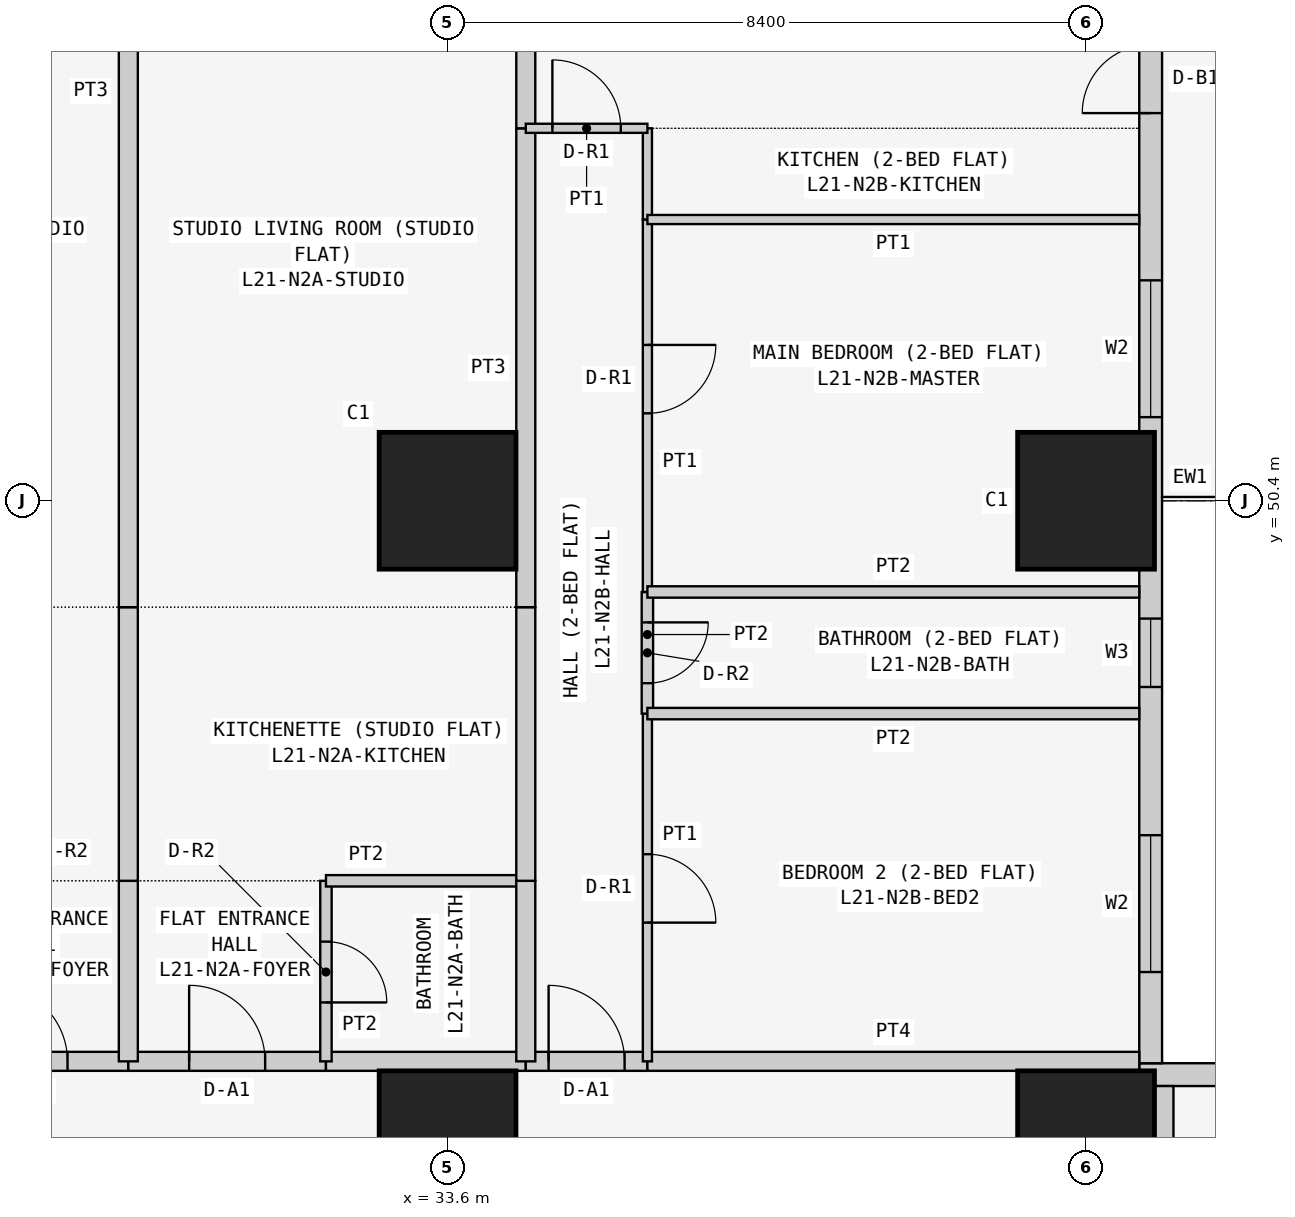
"""IFC4 building model, lengths in metres.
Left out: names, types, materials, properties, quantities, classifications, styles, units other than length and angle.
Written with IfcOpenShell. Run it as: python <this file> out.ifc"""

import sys

from ifc_helpers import new_model, si_unit, direction, frame, frame_2d, origin, origin_2d, place, context, subcontext, project, spatial, rectangle, extrude, element, fill, save


model = new_model("IFC4")
c1 = context("Model", 3, precision=1e-05, world=origin(), true_north=direction((0.0, 1.0)))
c2 = subcontext(c1, "Body", "Model", "MODEL_VIEW")
j1 = project(units=[si_unit("LENGTHUNIT", "METRE"), si_unit("PLANEANGLEUNIT", "RADIAN")], contexts=[c1])
p1 = place(None, origin())
s1 = spatial("IfcSite", under=j1, at=p1, CompositionType="ELEMENT")
p2 = place(p1, origin())
s2 = spatial("IfcBuilding", under=s1, at=p2, CompositionType="ELEMENT")
p3 = place(p2, frame((0.0, 0.0, 84.9)))
s3 = spatial("IfcBuildingStorey", under=s2, at=p3, CompositionType="ELEMENT", Elevation=84.9)
for number, where, z_axis, x_axis in (
    (1, (33.6, 42.0, 0.0), (0.0, 0.0, 1.0), (1.0, 0.0, 0.0)),
    (2, (33.6, 50.4, 0.0), (0.0, 0.0, 1.0), (1.0, 0.0, 0.0)),
    (3, (42.0, 42.0, 0.0), (0.0, 0.0, 1.0), (1.0, 0.0, 0.0)),
    (4, (42.0, 50.4, 0.0), (0.0, 0.0, 1.0), (1.0, 0.0, 0.0)),
):
    element("IfcColumn", number, at=place(p3, frame(where, z_axis=z_axis, x_axis=x_axis)), inside=s3, PredefinedType="COLUMN", context=c2, shape_type="SweptSolid", body=[
        extrude(rectangle(XDim=1.8, YDim=1.8, at=origin_2d()), origin(), (0.0, 0.0, 1.0), 3.6),
    ])
p4 = place(p3, frame((58.4, 42.85, 0.0), z_axis=(0.0, 0.0, 1.0), x_axis=(-1.0, 0.0, 0.0)))
e5 = element("IfcWall", 5, at=p4, inside=s3, PredefinedType="SOLIDWALL", context=c2, shape_type="SweptSolid", body=[
    extrude(rectangle(XDim=15.7, YDim=0.3, at=frame_2d((7.85, 0.0))), origin(), (0.0, 0.0, 1.0), 3.45),
])
p5 = place(p4, frame((12.4, 0.0, 0.9)))
e6 = element("IfcOpeningElement", 6, at=p5, cuts=e5, PredefinedType="OPENING", context=c2, shape_type="SweptSolid", body=[
    extrude(rectangle(XDim=1.8, YDim=1.5, at=frame_2d((0.9, 0.75))), frame((0.0, 0.16, 0.0), z_axis=(0.0, -1.0, 0.0), x_axis=(1.0, 0.0, 0.0)), (0.0, 0.0, 1.0), 0.32),
])
p6 = place(p4, frame((9.55, 0.0, 1.5)))
e7 = element("IfcOpeningElement", 7, at=p6, cuts=e5, PredefinedType="OPENING", context=c2, shape_type="SweptSolid", body=[
    extrude(rectangle(XDim=0.9, YDim=0.7, at=frame_2d((0.45, 0.35))), frame((0.0, 0.16, 0.0), z_axis=(0.0, -1.0, 0.0), x_axis=(1.0, 0.0, 0.0)), (0.0, 0.0, 1.0), 0.32),
])
p7 = place(p4, frame((5.1, 0.0, 0.9)))
e8 = element("IfcOpeningElement", 8, at=p7, cuts=e5, PredefinedType="OPENING", context=c2, shape_type="SweptSolid", body=[
    extrude(rectangle(XDim=1.8, YDim=1.5, at=frame_2d((0.9, 0.75))), frame((0.0, 0.16, 0.0), z_axis=(0.0, -1.0, 0.0), x_axis=(1.0, 0.0, 0.0)), (0.0, 0.0, 1.0), 0.32),
])
p8 = place(p4, frame((2.0, 0.0, 0.0)))
e9 = element("IfcOpeningElement", 9, at=p8, cuts=e5, PredefinedType="OPENING", context=c2, shape_type="SweptSolid", body=[
    extrude(rectangle(XDim=0.9, YDim=2.4, at=frame_2d((0.45, 1.2))), frame((0.0, 0.16, 0.0), z_axis=(0.0, -1.0, 0.0), x_axis=(1.0, 0.0, 0.0)), (0.0, 0.0, 1.0), 0.32),
])
p9 = place(p4, frame((0.7, 0.0, 0.9)))
e10 = element("IfcOpeningElement", 10, at=p9, cuts=e5, PredefinedType="OPENING", context=c2, shape_type="SweptSolid", body=[
    extrude(rectangle(XDim=1.2, YDim=1.5, at=frame_2d((0.6, 0.75))), frame((0.0, 0.16, 0.0), z_axis=(0.0, -1.0, 0.0), x_axis=(1.0, 0.0, 0.0)), (0.0, 0.0, 1.0), 0.32),
])
p10 = place(p3, frame((42.85, 43.0, 0.0), z_axis=(0.0, 0.0, 1.0), x_axis=(0.0, 1.0, 0.0)))
e11 = element("IfcWall", 11, at=p10, inside=s3, PredefinedType="SOLIDWALL", context=c2, shape_type="SweptSolid", body=[
    extrude(rectangle(XDim=15.4, YDim=0.3, at=frame_2d((7.7, 0.0))), origin(), (0.0, 0.0, 1.0), 3.45),
])
p11 = place(p10, frame((1.2, 0.0, 0.9)))
e12 = element("IfcOpeningElement", 12, at=p11, cuts=e11, PredefinedType="OPENING", context=c2, shape_type="SweptSolid", body=[
    extrude(rectangle(XDim=1.8, YDim=1.5, at=frame_2d((0.9, 0.75))), frame((0.0, 0.16, 0.0), z_axis=(0.0, -1.0, 0.0), x_axis=(1.0, 0.0, 0.0)), (0.0, 0.0, 1.0), 0.32),
])
p12 = place(p10, frame((4.95, 0.0, 1.5)))
e13 = element("IfcOpeningElement", 13, at=p12, cuts=e11, PredefinedType="OPENING", context=c2, shape_type="SweptSolid", body=[
    extrude(rectangle(XDim=0.9, YDim=0.7, at=frame_2d((0.45, 0.35))), frame((0.0, 0.16, 0.0), z_axis=(0.0, -1.0, 0.0), x_axis=(1.0, 0.0, 0.0)), (0.0, 0.0, 1.0), 0.32),
])
p13 = place(p10, frame((8.5, 0.0, 0.9)))
e14 = element("IfcOpeningElement", 14, at=p13, cuts=e11, PredefinedType="OPENING", context=c2, shape_type="SweptSolid", body=[
    extrude(rectangle(XDim=1.8, YDim=1.5, at=frame_2d((0.9, 0.75))), frame((0.0, 0.16, 0.0), z_axis=(0.0, -1.0, 0.0), x_axis=(1.0, 0.0, 0.0)), (0.0, 0.0, 1.0), 0.32),
])
p14 = place(p10, frame((12.5, 0.0, 0.0)))
e15 = element("IfcOpeningElement", 15, at=p14, cuts=e11, PredefinedType="OPENING", context=c2, shape_type="SweptSolid", body=[
    extrude(rectangle(XDim=0.9, YDim=2.4, at=frame_2d((0.45, 1.2))), frame((0.0, 0.16, 0.0), z_axis=(0.0, -1.0, 0.0), x_axis=(1.0, 0.0, 0.0)), (0.0, 0.0, 1.0), 0.32),
])
p15 = place(p10, frame((13.5, 0.0, 0.9)))
e16 = element("IfcOpeningElement", 16, at=p15, cuts=e11, PredefinedType="OPENING", context=c2, shape_type="SweptSolid", body=[
    extrude(rectangle(XDim=1.2, YDim=1.5, at=frame_2d((0.6, 0.75))), frame((0.0, 0.16, 0.0), z_axis=(0.0, -1.0, 0.0), x_axis=(1.0, 0.0, 0.0)), (0.0, 0.0, 1.0), 0.32),
])
p16 = place(p3, frame((26.8, 43.025, 0.0), z_axis=(0.0, 0.0, 1.0), x_axis=(1.0, 0.0, 0.0)))
e17 = element("IfcWall", 17, at=p16, inside=s3, PredefinedType="PARTITIONING", context=c2, shape_type="SweptSolid", body=[
    extrude(rectangle(XDim=2.6, YDim=0.25, at=frame_2d((1.3, 0.0))), origin(), (0.0, 0.0, 1.0), 3.45),
])
p17 = place(p16, frame((0.8, 0.0, 0.0)))
e18 = element("IfcOpeningElement", 18, at=p17, cuts=e17, PredefinedType="OPENING", context=c2, shape_type="SweptSolid", body=[
    extrude(rectangle(XDim=1.0, YDim=2.1, at=frame_2d((0.5, 1.05))), frame((0.0, 0.135, 0.0), z_axis=(0.0, -1.0, 0.0), x_axis=(1.0, 0.0, 0.0)), (0.0, 0.0, 1.0), 0.27),
])
p18 = place(p3, frame((29.4, 43.025, 0.0), z_axis=(0.0, 0.0, 1.0), x_axis=(1.0, 0.0, 0.0)))
e19 = element("IfcWall", 19, at=p18, inside=s3, PredefinedType="PARTITIONING", context=c2, shape_type="SweptSolid", body=[
    extrude(rectangle(XDim=2.6, YDim=0.25, at=frame_2d((1.3, 0.0))), origin(), (0.0, 0.0, 1.0), 3.45),
])
p19 = place(p18, frame((0.8, 0.0, 0.0)))
e20 = element("IfcOpeningElement", 20, at=p19, cuts=e19, PredefinedType="OPENING", context=c2, shape_type="SweptSolid", body=[
    extrude(rectangle(XDim=1.0, YDim=2.1, at=frame_2d((0.5, 1.05))), frame((0.0, 0.135, 0.0), z_axis=(0.0, -1.0, 0.0), x_axis=(1.0, 0.0, 0.0)), (0.0, 0.0, 1.0), 0.27),
])
p20 = place(p3, frame((32.0, 43.025, 0.0), z_axis=(0.0, 0.0, 1.0), x_axis=(1.0, 0.0, 0.0)))
e21 = element("IfcWall", 21, at=p20, inside=s3, PredefinedType="PARTITIONING", context=c2, shape_type="SweptSolid", body=[
    extrude(rectangle(XDim=2.629, YDim=0.25, at=frame_2d((1.314, 0.0))), origin(), (0.0, 0.0, 1.0), 3.45),
])
p21 = place(p3, frame((34.629, 43.025, 0.0), z_axis=(0.0, 0.0, 1.0), x_axis=(1.0, 0.0, 0.0)))
e22 = element("IfcWall", 22, at=p21, inside=s3, PredefinedType="PARTITIONING", context=c2, shape_type="SweptSolid", body=[
    extrude(rectangle(XDim=1.6, YDim=0.25, at=frame_2d((0.8, 0.0))), origin(), (0.0, 0.0, 1.0), 3.45),
])
p22 = place(p21, frame((0.3, 0.0, 0.0)))
e23 = element("IfcOpeningElement", 23, at=p22, cuts=e22, PredefinedType="OPENING", context=c2, shape_type="SweptSolid", body=[
    extrude(rectangle(XDim=1.0, YDim=2.1, at=frame_2d((0.5, 1.05))), frame((0.0, 0.135, 0.0), z_axis=(0.0, -1.0, 0.0), x_axis=(1.0, 0.0, 0.0)), (0.0, 0.0, 1.0), 0.27),
])
for number, where, z_axis, x_axis in (
    (24, (36.229, 43.025, 0.0), (0.0, 0.0, 1.0), (1.0, 0.0, 0.0)),
    (25, (43.025, 42.7, 0.0), (0.0, 0.0, 1.0), (0.0, -1.0, 0.0)),
):
    element("IfcWall", number, at=place(p3, frame(where, z_axis=z_axis, x_axis=x_axis)), inside=s3, PredefinedType="PARTITIONING", context=c2, shape_type="SweptSolid", body=[
        extrude(rectangle(XDim=6.471, YDim=0.25, at=frame_2d((3.235, 0.0))), origin(), (0.0, 0.0, 1.0), 3.45),
    ])
p23 = place(p3, frame((29.4, 43.025, 0.0), z_axis=(0.0, 0.0, 1.0), x_axis=(0.0, 1.0, 0.0)))
e26 = element("IfcWall", 26, at=p23, inside=s3, PredefinedType="PARTITIONING", context=c2, shape_type="SweptSolid", body=[
    extrude(rectangle(XDim=2.375, YDim=0.25, at=frame_2d((1.188, 0.0))), origin(), (0.0, 0.0, 1.0), 2.848),
])
p24 = place(p3, frame((29.4, 45.4, 0.0), z_axis=(0.0, 0.0, 1.0), x_axis=(0.0, 1.0, 0.0)))
e27 = element("IfcWall", 27, at=p24, inside=s3, PredefinedType="PARTITIONING", context=c2, shape_type="SweptSolid", body=[
    extrude(rectangle(XDim=3.6, YDim=0.25, at=frame_2d((1.8, 0.0))), origin(), (0.0, 0.0, 1.0), 2.848),
])
p25 = place(p3, frame((29.4, 49.0, 0.0), z_axis=(0.0, 0.0, 1.0), x_axis=(0.0, 1.0, 0.0)))
e28 = element("IfcWall", 28, at=p25, inside=s3, PredefinedType="PARTITIONING", context=c2, shape_type="SweptSolid", body=[
    extrude(rectangle(XDim=10.45, YDim=0.25, at=frame_2d((5.225, 0.0))), origin(), (0.0, 0.0, 1.0), 2.848),
])
p26 = place(p3, frame((32.0, 45.4, 0.0), z_axis=(0.0, 0.0, 1.0), x_axis=(0.0, -1.0, 0.0)))
e29 = element("IfcWall", 29, at=p26, inside=s3, PredefinedType="PARTITIONING", context=c2, shape_type="SweptSolid", body=[
    extrude(rectangle(XDim=2.375, YDim=0.15, at=frame_2d((1.188, 0.0))), origin(), (0.0, 0.0, 1.0), 3.45),
])
p27 = place(p26, frame((0.8, 0.0, 0.0)))
e30 = element("IfcOpeningElement", 30, at=p27, cuts=e29, PredefinedType="OPENING", context=c2, shape_type="SweptSolid", body=[
    extrude(rectangle(XDim=0.8, YDim=2.1, at=frame_2d((0.4, 1.05))), frame((0.0, 0.085, 0.0), z_axis=(0.0, -1.0, 0.0), x_axis=(1.0, 0.0, 0.0)), (0.0, 0.0, 1.0), 0.17),
])
p28 = place(p3, frame((32.0, 45.4, 0.0), z_axis=(0.0, 0.0, 1.0), x_axis=(1.0, 0.0, 0.0)))
e31 = element("IfcWall", 31, at=p28, inside=s3, PredefinedType="PARTITIONING", context=c2, shape_type="SweptSolid", body=[
    extrude(rectangle(XDim=2.629, YDim=0.15, at=frame_2d((1.314, 0.0))), origin(), (0.0, 0.0, 1.0), 3.45),
])
p29 = place(p3, frame((34.629, 45.4, 0.0), z_axis=(0.0, 0.0, 1.0), x_axis=(0.0, -1.0, 0.0)))
e32 = element("IfcWall", 32, at=p29, inside=s3, PredefinedType="PARTITIONING", context=c2, shape_type="SweptSolid", body=[
    extrude(rectangle(XDim=2.375, YDim=0.25, at=frame_2d((1.188, 0.0))), origin(), (0.0, 0.0, 1.0), 3.45),
])
p30 = place(p3, frame((34.629, 49.0, 0.0), z_axis=(0.0, 0.0, 1.0), x_axis=(0.0, -1.0, 0.0)))
e33 = element("IfcWall", 33, at=p30, inside=s3, PredefinedType="PARTITIONING", context=c2, shape_type="SweptSolid", body=[
    extrude(rectangle(XDim=3.6, YDim=0.25, at=frame_2d((1.8, 0.0))), origin(), (0.0, 0.0, 1.0), 3.45),
])
p31 = place(p3, frame((34.629, 55.3, 0.0), z_axis=(0.0, 0.0, 1.0), x_axis=(0.0, -1.0, 0.0)))
e34 = element("IfcWall", 34, at=p31, inside=s3, PredefinedType="PARTITIONING", context=c2, shape_type="SweptSolid", body=[
    extrude(rectangle(XDim=6.3, YDim=0.25, at=frame_2d((3.15, 0.0))), origin(), (0.0, 0.0, 1.0), 3.45),
])
p32 = place(p3, frame((34.629, 59.45, 0.0), z_axis=(0.0, 0.0, 1.0), x_axis=(0.0, -1.0, 0.0)))
e35 = element("IfcWall", 35, at=p32, inside=s3, PredefinedType="PARTITIONING", context=c2, shape_type="SweptSolid", body=[
    extrude(rectangle(XDim=4.15, YDim=0.25, at=frame_2d((2.075, 0.0))), origin(), (0.0, 0.0, 1.0), 3.45),
])
p33 = place(p3, frame((36.229, 47.6, 0.0), z_axis=(0.0, 0.0, 1.0), x_axis=(0.0, -1.0, 0.0)))
e36 = element("IfcWall", 36, at=p33, inside=s3, PredefinedType="PARTITIONING", context=c2, shape_type="SweptSolid", body=[
    extrude(rectangle(XDim=4.575, YDim=0.12, at=frame_2d((2.288, 0.0))), origin(), (0.0, 0.0, 1.0), 3.45),
])
p34 = place(p33, frame((1.85, 0.0, 0.0)))
e37 = element("IfcOpeningElement", 37, at=p34, cuts=e36, PredefinedType="OPENING", context=c2, shape_type="SweptSolid", body=[
    extrude(rectangle(XDim=0.9, YDim=2.1, at=frame_2d((0.45, 1.05))), frame((0.0, 0.07, 0.0), z_axis=(0.0, -1.0, 0.0), x_axis=(1.0, 0.0, 0.0)), (0.0, 0.0, 1.0), 0.14),
])
p35 = place(p3, frame((36.229, 49.2, 0.0), z_axis=(0.0, 0.0, 1.0), x_axis=(0.0, -1.0, 0.0)))
e38 = element("IfcWall", 38, at=p35, inside=s3, PredefinedType="PARTITIONING", context=c2, shape_type="SweptSolid", body=[
    extrude(rectangle(XDim=1.6, YDim=0.15, at=frame_2d((0.8, 0.0))), origin(), (0.0, 0.0, 1.0), 3.45),
])
p36 = place(p35, frame((0.4, 0.0, 0.0)))
e39 = element("IfcOpeningElement", 39, at=p36, cuts=e38, PredefinedType="OPENING", context=c2, shape_type="SweptSolid", body=[
    extrude(rectangle(XDim=0.8, YDim=2.1, at=frame_2d((0.4, 1.05))), frame((0.0, 0.085, 0.0), z_axis=(0.0, -1.0, 0.0), x_axis=(1.0, 0.0, 0.0)), (0.0, 0.0, 1.0), 0.17),
])
p37 = place(p3, frame((36.229, 54.1, 0.0), z_axis=(0.0, 0.0, 1.0), x_axis=(0.0, -1.0, 0.0)))
e40 = element("IfcWall", 40, at=p37, inside=s3, PredefinedType="PARTITIONING", context=c2, shape_type="SweptSolid", body=[
    extrude(rectangle(XDim=4.9, YDim=0.12, at=frame_2d((2.45, 0.0))), origin(), (0.0, 0.0, 1.0), 3.45),
])
p38 = place(p37, frame((1.65, 0.0, 0.0)))
e41 = element("IfcOpeningElement", 41, at=p38, cuts=e40, PredefinedType="OPENING", context=c2, shape_type="SweptSolid", body=[
    extrude(rectangle(XDim=0.9, YDim=2.1, at=frame_2d((0.45, 1.05))), frame((0.0, 0.07, 0.0), z_axis=(0.0, -1.0, 0.0), x_axis=(1.0, 0.0, 0.0)), (0.0, 0.0, 1.0), 0.14),
])
p39 = place(p3, frame((36.229, 55.3, 0.0), z_axis=(0.0, 0.0, 1.0), x_axis=(0.0, -1.0, 0.0)))
e42 = element("IfcWall", 42, at=p39, inside=s3, PredefinedType="PARTITIONING", context=c2, shape_type="SweptSolid", body=[
    extrude(rectangle(XDim=1.2, YDim=0.12, at=frame_2d((0.6, 0.0))), origin(), (0.0, 0.0, 1.0), 3.45),
])
p40 = place(p3, frame((34.629, 55.3, 0.0), z_axis=(0.0, 0.0, 1.0), x_axis=(1.0, 0.0, 0.0)))
e43 = element("IfcWall", 43, at=p40, inside=s3, PredefinedType="PARTITIONING", context=c2, shape_type="SweptSolid", body=[
    extrude(rectangle(XDim=1.6, YDim=0.12, at=frame_2d((0.8, 0.0))), origin(), (0.0, 0.0, 1.0), 3.45),
])
p41 = place(p40, frame((0.35, 0.0, 0.0)))
e44 = element("IfcOpeningElement", 44, at=p41, cuts=e43, PredefinedType="OPENING", context=c2, shape_type="SweptSolid", body=[
    extrude(rectangle(XDim=0.9, YDim=2.1, at=frame_2d((0.45, 1.05))), frame((0.0, 0.07, 0.0), z_axis=(0.0, -1.0, 0.0), x_axis=(1.0, 0.0, 0.0)), (0.0, 0.0, 1.0), 0.14),
])
for number, where, z_axis, x_axis in (
    (45, (36.229, 47.6, 0.0), (0.0, 0.0, 1.0), (1.0, 0.0, 0.0)),
    (46, (36.229, 49.2, 0.0), (0.0, 0.0, 1.0), (1.0, 0.0, 0.0)),
):
    element("IfcWall", number, at=place(p3, frame(where, z_axis=z_axis, x_axis=x_axis)), inside=s3, PredefinedType="PARTITIONING", context=c2, shape_type="SweptSolid", body=[
        extrude(rectangle(XDim=6.471, YDim=0.15, at=frame_2d((3.235, 0.0))), origin(), (0.0, 0.0, 1.0), 3.45),
    ])
p42 = place(p3, frame((36.229, 54.1, 0.0), z_axis=(0.0, 0.0, 1.0), x_axis=(1.0, 0.0, 0.0)))
e47 = element("IfcWall", 47, at=p42, inside=s3, PredefinedType="PARTITIONING", context=c2, shape_type="SweptSolid", body=[
    extrude(rectangle(XDim=6.471, YDim=0.12, at=frame_2d((3.235, 0.0))), origin(), (0.0, 0.0, 1.0), 3.45),
])
p43 = place(p11, origin())
e48 = element("IfcWindow", 48, at=p43, inside=s3, PartitioningType="SINGLE_PANEL", PredefinedType="WINDOW", context=c2, shape_type="SweptSolid", body=[
    extrude(rectangle(XDim=1.8, YDim=1.5, at=frame_2d((0.9, 0.75))), frame((0.0, 0.03, 0.0), z_axis=(0.0, -1.0, 0.0), x_axis=(1.0, 0.0, 0.0)), (0.0, 0.0, 1.0), 0.06),
])
fill(e12, e48)
p44 = place(p12, origin())
e49 = element("IfcWindow", 49, at=p44, inside=s3, PartitioningType="SINGLE_PANEL", PredefinedType="WINDOW", context=c2, shape_type="SweptSolid", body=[
    extrude(rectangle(XDim=0.9, YDim=0.7, at=frame_2d((0.45, 0.35))), frame((0.0, 0.03, 0.0), z_axis=(0.0, -1.0, 0.0), x_axis=(1.0, 0.0, 0.0)), (0.0, 0.0, 1.0), 0.06),
])
fill(e13, e49)
p45 = place(p13, origin())
e50 = element("IfcWindow", 50, at=p45, inside=s3, PartitioningType="SINGLE_PANEL", PredefinedType="WINDOW", context=c2, shape_type="SweptSolid", body=[
    extrude(rectangle(XDim=1.8, YDim=1.5, at=frame_2d((0.9, 0.75))), frame((0.0, 0.03, 0.0), z_axis=(0.0, -1.0, 0.0), x_axis=(1.0, 0.0, 0.0)), (0.0, 0.0, 1.0), 0.06),
])
fill(e14, e50)
p46 = place(p14, origin())
e51 = element("IfcDoor", 51, at=p46, inside=s3, OperationType="SINGLE_SWING_LEFT", PredefinedType="DOOR", context=c2, shape_type="SweptSolid", body=[
    extrude(rectangle(XDim=0.9, YDim=2.4, at=frame_2d((0.45, 1.2))), frame((0.0, 0.025, 0.0), z_axis=(0.0, -1.0, 0.0), x_axis=(1.0, 0.0, 0.0)), (0.0, 0.0, 1.0), 0.05),
])
fill(e15, e51)
p47 = place(p17, origin())
e52 = element("IfcDoor", 52, at=p47, inside=s3, OperationType="SINGLE_SWING_LEFT", PredefinedType="DOOR", context=c2, shape_type="SweptSolid", body=[
    extrude(rectangle(XDim=1.0, YDim=2.1, at=frame_2d((0.5, 1.05))), frame((0.0, 0.025, 0.0), z_axis=(0.0, -1.0, 0.0), x_axis=(1.0, 0.0, 0.0)), (0.0, 0.0, 1.0), 0.05),
])
fill(e18, e52)
p48 = place(p19, origin())
e53 = element("IfcDoor", 53, at=p48, inside=s3, OperationType="SINGLE_SWING_LEFT", PredefinedType="DOOR", context=c2, shape_type="SweptSolid", body=[
    extrude(rectangle(XDim=1.0, YDim=2.1, at=frame_2d((0.5, 1.05))), frame((0.0, 0.025, 0.0), z_axis=(0.0, -1.0, 0.0), x_axis=(1.0, 0.0, 0.0)), (0.0, 0.0, 1.0), 0.05),
])
fill(e20, e53)
p49 = place(p27, origin())
e54 = element("IfcDoor", 54, at=p49, inside=s3, OperationType="SINGLE_SWING_RIGHT", PredefinedType="DOOR", context=c2, shape_type="SweptSolid", body=[
    extrude(rectangle(XDim=0.8, YDim=2.1, at=frame_2d((0.4, 1.05))), frame((0.0, 0.025, 0.0), z_axis=(0.0, -1.0, 0.0), x_axis=(1.0, 0.0, 0.0)), (0.0, 0.0, 1.0), 0.05),
])
fill(e30, e54)
p50 = place(p22, origin())
e55 = element("IfcDoor", 55, at=p50, inside=s3, OperationType="SINGLE_SWING_LEFT", PredefinedType="DOOR", context=c2, shape_type="SweptSolid", body=[
    extrude(rectangle(XDim=1.0, YDim=2.1, at=frame_2d((0.5, 1.05))), frame((0.0, 0.025, 0.0), z_axis=(0.0, -1.0, 0.0), x_axis=(1.0, 0.0, 0.0)), (0.0, 0.0, 1.0), 0.05),
])
fill(e23, e55)
p51 = place(p34, origin())
e56 = element("IfcDoor", 56, at=p51, inside=s3, OperationType="SINGLE_SWING_RIGHT", PredefinedType="DOOR", context=c2, shape_type="SweptSolid", body=[
    extrude(rectangle(XDim=0.9, YDim=2.1, at=frame_2d((0.45, 1.05))), frame((0.0, 0.025, 0.0), z_axis=(0.0, -1.0, 0.0), x_axis=(1.0, 0.0, 0.0)), (0.0, 0.0, 1.0), 0.05),
])
fill(e37, e56)
p52 = place(p36, origin())
e57 = element("IfcDoor", 57, at=p52, inside=s3, OperationType="SINGLE_SWING_LEFT", PredefinedType="DOOR", context=c2, shape_type="SweptSolid", body=[
    extrude(rectangle(XDim=0.8, YDim=2.1, at=frame_2d((0.4, 1.05))), frame((0.0, 0.025, 0.0), z_axis=(0.0, -1.0, 0.0), x_axis=(1.0, 0.0, 0.0)), (0.0, 0.0, 1.0), 0.05),
])
fill(e39, e57)
p53 = place(p38, origin())
e58 = element("IfcDoor", 58, at=p53, inside=s3, OperationType="SINGLE_SWING_LEFT", PredefinedType="DOOR", context=c2, shape_type="SweptSolid", body=[
    extrude(rectangle(XDim=0.9, YDim=2.1, at=frame_2d((0.45, 1.05))), frame((0.0, 0.025, 0.0), z_axis=(0.0, -1.0, 0.0), x_axis=(1.0, 0.0, 0.0)), (0.0, 0.0, 1.0), 0.05),
])
fill(e41, e58)
p54 = place(p41, origin())
e59 = element("IfcDoor", 59, at=p54, inside=s3, OperationType="SINGLE_SWING_LEFT", PredefinedType="DOOR", context=c2, shape_type="SweptSolid", body=[
    extrude(rectangle(XDim=0.9, YDim=2.1, at=frame_2d((0.45, 1.05))), frame((0.0, 0.025, 0.0), z_axis=(0.0, -1.0, 0.0), x_axis=(1.0, 0.0, 0.0)), (0.0, 0.0, 1.0), 0.05),
])
fill(e44, e59)
save(model, sys.argv[1])
